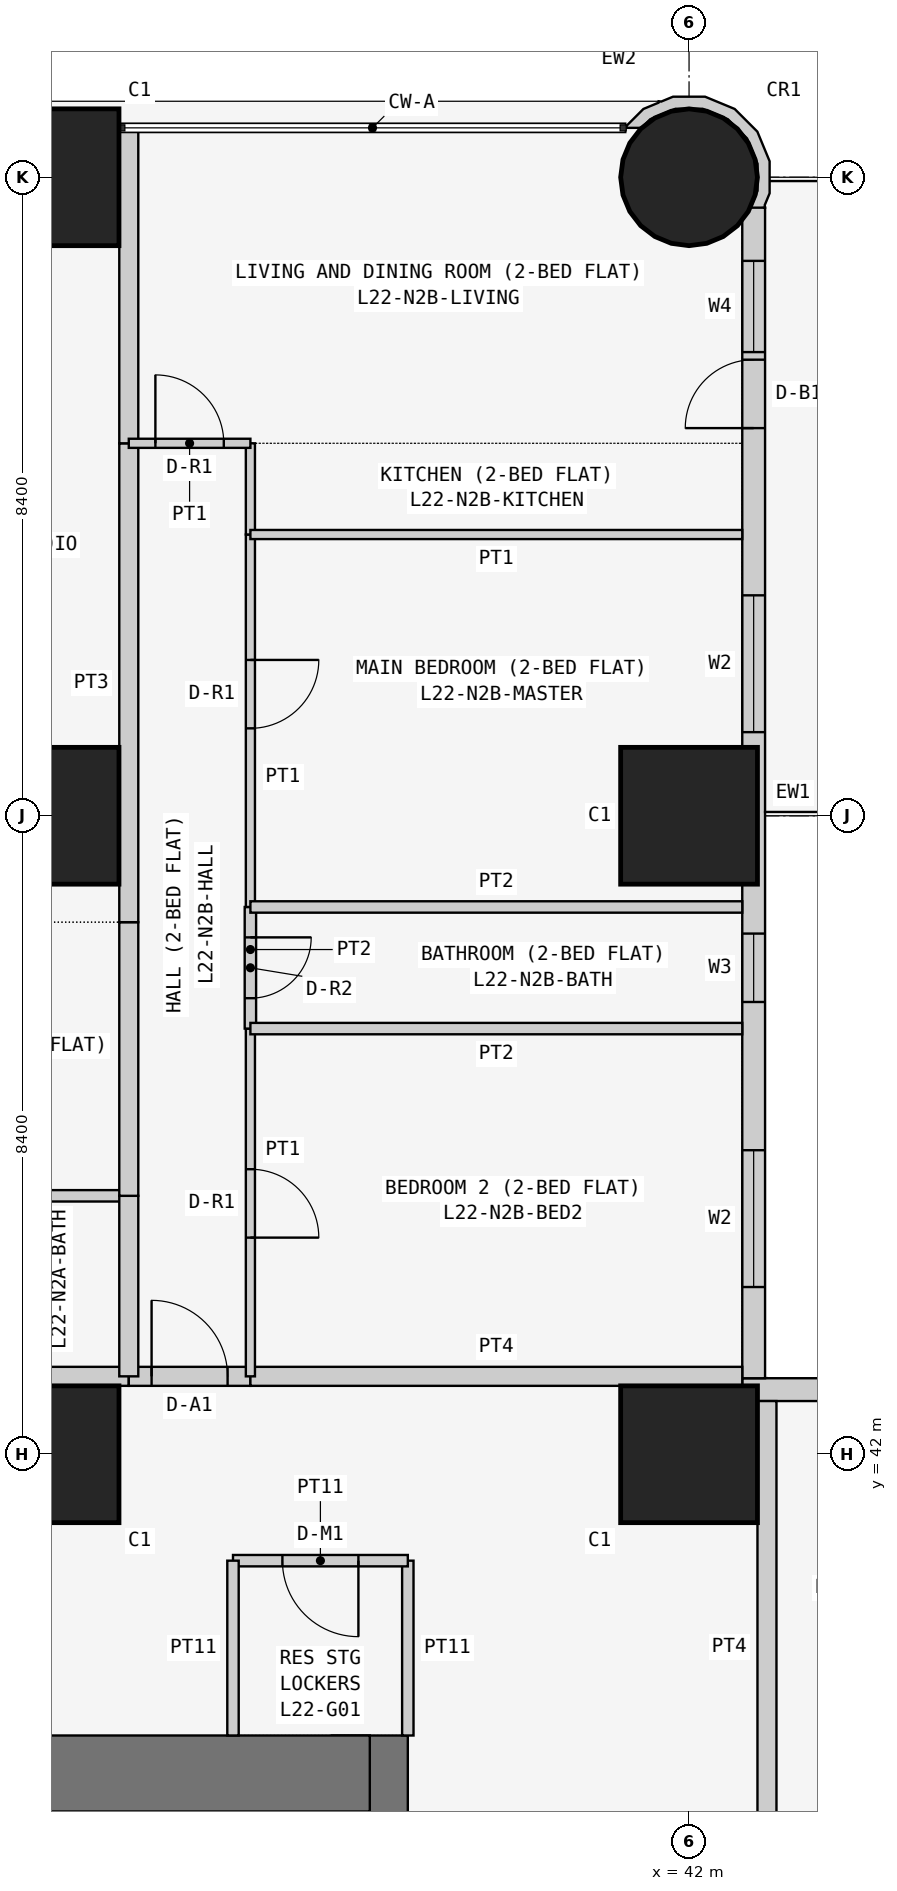
"""IFC4 building model, lengths in metres.
Left out: names, types, materials, properties, quantities, classifications, styles, units other than length and angle.
Written with IfcOpenShell. Run it as: python <this file> out.ifc"""

import sys

from ifc_helpers import new_model, si_unit, direction, frame, frame_2d, origin, origin_2d, place, context, subcontext, project, spatial, polyline, rectangle, circle, outline, extrude, element, fill, save


model = new_model("IFC4")
c1 = context("Model", 3, precision=1e-05, world=origin(), true_north=direction((0.0, 1.0)))
c2 = subcontext(c1, "Body", "Model", "MODEL_VIEW")
j1 = project(units=[si_unit("LENGTHUNIT", "METRE"), si_unit("PLANEANGLEUNIT", "RADIAN")], contexts=[c1])
p1 = place(None, origin())
s1 = spatial("IfcSite", under=j1, at=p1, CompositionType="ELEMENT")
p2 = place(p1, origin())
s2 = spatial("IfcBuilding", under=s1, at=p2, CompositionType="ELEMENT")
p3 = place(p2, frame((0.0, 0.0, 88.5)))
s3 = spatial("IfcBuildingStorey", under=s2, at=p3, CompositionType="ELEMENT", Elevation=88.5)
for number, where, z_axis, x_axis in (
    (1, (33.6, 42.0, 0.0), (0.0, 0.0, 1.0), (1.0, 0.0, 0.0)),
    (2, (33.6, 50.4, 0.0), (0.0, 0.0, 1.0), (1.0, 0.0, 0.0)),
    (3, (33.6, 58.8, 0.0), (0.0, 0.0, 1.0), (1.0, 0.0, 0.0)),
    (4, (42.0, 42.0, 0.0), (0.0, 0.0, 1.0), (1.0, 0.0, 0.0)),
    (5, (42.0, 50.4, 0.0), (0.0, 0.0, 1.0), (1.0, 0.0, 0.0)),
):
    element("IfcColumn", number, at=place(p3, frame(where, z_axis=z_axis, x_axis=x_axis)), inside=s3, PredefinedType="COLUMN", context=c2, shape_type="SweptSolid", body=[
        extrude(rectangle(XDim=1.8, YDim=1.8, at=origin_2d()), origin(), (0.0, 0.0, 1.0), 3.6),
    ])
p4 = place(p3, frame((42.0, 58.8, 0.0), z_axis=(0.0, 0.0, 1.0), x_axis=(1.0, 0.0, 0.0)))
e6 = element("IfcColumn", 6, at=p4, inside=s3, PredefinedType="COLUMN", context=c2, shape_type="SweptSolid", body=[
    extrude(circle(Radius=0.9, at=origin_2d()), origin(), (0.0, 0.0, 1.0), 3.6),
])
p5 = place(p3, frame((37.8, 21.0, 0.0), z_axis=(0.0, 0.0, 1.0), x_axis=(0.0, 1.0, 0.0)))
e7 = element("IfcWall", 7, at=p5, inside=s3, PredefinedType="SHEAR", context=c2, shape_type="SweptSolid", body=[
    extrude(rectangle(XDim=17.3, YDim=1.0, at=frame_2d((8.65, 0.0))), origin(), (0.0, 0.0, 1.0), 3.6),
])
p6 = place(p5, frame((5.2, 0.0, 0.0)))
e8 = element("IfcOpeningElement", 8, at=p6, cuts=e7, PredefinedType="OPENING", context=c2, shape_type="SweptSolid", body=[
    extrude(rectangle(XDim=1.2, YDim=2.1, at=frame_2d((0.6, 1.05))), frame((0.0, 0.51, 0.0), z_axis=(0.0, -1.0, 0.0), x_axis=(1.0, 0.0, 0.0)), (0.0, 0.0, 1.0), 1.02),
])
p7 = place(p3, frame((37.8, 37.8, 0.0), z_axis=(0.0, 0.0, 1.0), x_axis=(-1.0, 0.0, 0.0)))
e9 = element("IfcWall", 9, at=p7, inside=s3, PredefinedType="SHEAR", context=c2, shape_type="SweptSolid", body=[
    extrude(rectangle(XDim=17.3, YDim=1.0, at=frame_2d((8.65, 0.0))), origin(), (0.0, 0.0, 1.0), 3.6),
])
p8 = place(p3, frame((58.4, 42.85, 0.0), z_axis=(0.0, 0.0, 1.0), x_axis=(-1.0, 0.0, 0.0)))
e10 = element("IfcWall", 10, at=p8, inside=s3, PredefinedType="SOLIDWALL", context=c2, shape_type="SweptSolid", body=[
    extrude(rectangle(XDim=15.7, YDim=0.3, at=frame_2d((7.85, 0.0))), origin(), (0.0, 0.0, 1.0), 3.45),
])
p9 = place(p8, frame((12.4, 0.0, 0.9)))
e11 = element("IfcOpeningElement", 11, at=p9, cuts=e10, PredefinedType="OPENING", context=c2, shape_type="SweptSolid", body=[
    extrude(rectangle(XDim=1.8, YDim=1.5, at=frame_2d((0.9, 0.75))), frame((0.0, 0.16, 0.0), z_axis=(0.0, -1.0, 0.0), x_axis=(1.0, 0.0, 0.0)), (0.0, 0.0, 1.0), 0.32),
])
p10 = place(p8, frame((9.55, 0.0, 1.5)))
e12 = element("IfcOpeningElement", 12, at=p10, cuts=e10, PredefinedType="OPENING", context=c2, shape_type="SweptSolid", body=[
    extrude(rectangle(XDim=0.9, YDim=0.7, at=frame_2d((0.45, 0.35))), frame((0.0, 0.16, 0.0), z_axis=(0.0, -1.0, 0.0), x_axis=(1.0, 0.0, 0.0)), (0.0, 0.0, 1.0), 0.32),
])
p11 = place(p8, frame((5.1, 0.0, 0.9)))
e13 = element("IfcOpeningElement", 13, at=p11, cuts=e10, PredefinedType="OPENING", context=c2, shape_type="SweptSolid", body=[
    extrude(rectangle(XDim=1.8, YDim=1.5, at=frame_2d((0.9, 0.75))), frame((0.0, 0.16, 0.0), z_axis=(0.0, -1.0, 0.0), x_axis=(1.0, 0.0, 0.0)), (0.0, 0.0, 1.0), 0.32),
])
p12 = place(p8, frame((2.0, 0.0, 0.0)))
e14 = element("IfcOpeningElement", 14, at=p12, cuts=e10, PredefinedType="OPENING", context=c2, shape_type="SweptSolid", body=[
    extrude(rectangle(XDim=0.9, YDim=2.4, at=frame_2d((0.45, 1.2))), frame((0.0, 0.16, 0.0), z_axis=(0.0, -1.0, 0.0), x_axis=(1.0, 0.0, 0.0)), (0.0, 0.0, 1.0), 0.32),
])
p13 = place(p8, frame((0.7, 0.0, 0.9)))
e15 = element("IfcOpeningElement", 15, at=p13, cuts=e10, PredefinedType="OPENING", context=c2, shape_type="SweptSolid", body=[
    extrude(rectangle(XDim=1.2, YDim=1.5, at=frame_2d((0.6, 0.75))), frame((0.0, 0.16, 0.0), z_axis=(0.0, -1.0, 0.0), x_axis=(1.0, 0.0, 0.0)), (0.0, 0.0, 1.0), 0.32),
])
p14 = place(p3, frame((42.85, 43.0, 0.0), z_axis=(0.0, 0.0, 1.0), x_axis=(0.0, 1.0, 0.0)))
e16 = element("IfcWall", 16, at=p14, inside=s3, PredefinedType="SOLIDWALL", context=c2, shape_type="SweptSolid", body=[
    extrude(rectangle(XDim=15.4, YDim=0.3, at=frame_2d((7.7, 0.0))), origin(), (0.0, 0.0, 1.0), 3.45),
])
p15 = place(p14, frame((1.2, 0.0, 0.9)))
e17 = element("IfcOpeningElement", 17, at=p15, cuts=e16, PredefinedType="OPENING", context=c2, shape_type="SweptSolid", body=[
    extrude(rectangle(XDim=1.8, YDim=1.5, at=frame_2d((0.9, 0.75))), frame((0.0, 0.16, 0.0), z_axis=(0.0, -1.0, 0.0), x_axis=(1.0, 0.0, 0.0)), (0.0, 0.0, 1.0), 0.32),
])
p16 = place(p14, frame((4.95, 0.0, 1.5)))
e18 = element("IfcOpeningElement", 18, at=p16, cuts=e16, PredefinedType="OPENING", context=c2, shape_type="SweptSolid", body=[
    extrude(rectangle(XDim=0.9, YDim=0.7, at=frame_2d((0.45, 0.35))), frame((0.0, 0.16, 0.0), z_axis=(0.0, -1.0, 0.0), x_axis=(1.0, 0.0, 0.0)), (0.0, 0.0, 1.0), 0.32),
])
p17 = place(p14, frame((8.5, 0.0, 0.9)))
e19 = element("IfcOpeningElement", 19, at=p17, cuts=e16, PredefinedType="OPENING", context=c2, shape_type="SweptSolid", body=[
    extrude(rectangle(XDim=1.8, YDim=1.5, at=frame_2d((0.9, 0.75))), frame((0.0, 0.16, 0.0), z_axis=(0.0, -1.0, 0.0), x_axis=(1.0, 0.0, 0.0)), (0.0, 0.0, 1.0), 0.32),
])
p18 = place(p14, frame((12.5, 0.0, 0.0)))
e20 = element("IfcOpeningElement", 20, at=p18, cuts=e16, PredefinedType="OPENING", context=c2, shape_type="SweptSolid", body=[
    extrude(rectangle(XDim=0.9, YDim=2.4, at=frame_2d((0.45, 1.2))), frame((0.0, 0.16, 0.0), z_axis=(0.0, -1.0, 0.0), x_axis=(1.0, 0.0, 0.0)), (0.0, 0.0, 1.0), 0.32),
])
p19 = place(p14, frame((13.5, 0.0, 0.9)))
e21 = element("IfcOpeningElement", 21, at=p19, cuts=e16, PredefinedType="OPENING", context=c2, shape_type="SweptSolid", body=[
    extrude(rectangle(XDim=1.2, YDim=1.5, at=frame_2d((0.6, 0.75))), frame((0.0, 0.16, 0.0), z_axis=(0.0, -1.0, 0.0), x_axis=(1.0, 0.0, 0.0)), (0.0, 0.0, 1.0), 0.32),
])
p20 = place(p3, frame((42.91, 58.436, 0.0), z_axis=(0.0, 0.0, 1.0), x_axis=(0.377204953059, 0.926129809145, 0.0)))
e22 = element("IfcWall", 22, at=p20, inside=s3, PredefinedType="SOLIDWALL", context=c2, shape_type="SweptSolid", body=[
    extrude(outline(polyline([(0.769, 1.728), (0.75, 1.723), (0.6, 1.875), (0.295, 2.004), (0.281, 1.998), (0.36, 1.803), (0.509, 1.741), (0.761, 1.486), (0.896, 1.154), (0.894, 0.795), (0.755, 0.465), (0.5, 0.213), (0.168, 0.078), (-0.1, 0.08), (0.001, -0.097), (0.03, -0.08), (0.198, -0.081), (0.589, 0.078), (0.889, 0.374), (1.052, 0.763), (1.055, 1.185), (0.896, 1.575), (0.778, 1.695), (0.769, 1.728)])), origin(), (0.0, 0.0, 1.0), 3.45),
])
p21 = place(p3, frame((38.3, 38.3, 0.0), z_axis=(0.0, 0.0, 1.0), x_axis=(0.0, 1.0, 0.0)))
e23 = element("IfcWall", 23, at=p21, inside=s3, PredefinedType="PARTITIONING", context=c2, shape_type="SweptSolid", body=[
    extrude(rectangle(XDim=2.3, YDim=0.15, at=frame_2d((1.15, 0.0))), origin(), (0.0, 0.0, 1.0), 3.45),
])
p22 = place(p3, frame((38.3, 40.6, 0.0), z_axis=(0.0, 0.0, 1.0), x_axis=(-1.0, 0.0, 0.0)))
e24 = element("IfcWall", 24, at=p22, inside=s3, PredefinedType="PARTITIONING", context=c2, shape_type="SweptSolid", body=[
    extrude(rectangle(XDim=2.3, YDim=0.15, at=frame_2d((1.15, 0.0))), origin(), (0.0, 0.0, 1.0), 3.45),
])
p23 = place(p22, frame((0.65, 0.0, 0.0)))
e25 = element("IfcOpeningElement", 25, at=p23, cuts=e24, PredefinedType="OPENING", context=c2, shape_type="SweptSolid", body=[
    extrude(rectangle(XDim=1.0, YDim=2.1, at=frame_2d((0.5, 1.05))), frame((0.0, 0.085, 0.0), z_axis=(0.0, -1.0, 0.0), x_axis=(1.0, 0.0, 0.0)), (0.0, 0.0, 1.0), 0.17),
])
p24 = place(p3, frame((36.0, 40.6, 0.0), z_axis=(0.0, 0.0, 1.0), x_axis=(0.0, -1.0, 0.0)))
e26 = element("IfcWall", 26, at=p24, inside=s3, PredefinedType="PARTITIONING", context=c2, shape_type="SweptSolid", body=[
    extrude(rectangle(XDim=2.3, YDim=0.15, at=frame_2d((1.15, 0.0))), origin(), (0.0, 0.0, 1.0), 3.45),
])
p25 = place(p3, frame((32.0, 43.025, 0.0), z_axis=(0.0, 0.0, 1.0), x_axis=(1.0, 0.0, 0.0)))
e27 = element("IfcWall", 27, at=p25, inside=s3, PredefinedType="PARTITIONING", context=c2, shape_type="SweptSolid", body=[
    extrude(rectangle(XDim=2.629, YDim=0.25, at=frame_2d((1.314, 0.0))), origin(), (0.0, 0.0, 1.0), 3.45),
])
p26 = place(p3, frame((34.629, 43.025, 0.0), z_axis=(0.0, 0.0, 1.0), x_axis=(1.0, 0.0, 0.0)))
e28 = element("IfcWall", 28, at=p26, inside=s3, PredefinedType="PARTITIONING", context=c2, shape_type="SweptSolid", body=[
    extrude(rectangle(XDim=1.6, YDim=0.25, at=frame_2d((0.8, 0.0))), origin(), (0.0, 0.0, 1.0), 3.45),
])
p27 = place(p26, frame((0.3, 0.0, 0.0)))
e29 = element("IfcOpeningElement", 29, at=p27, cuts=e28, PredefinedType="OPENING", context=c2, shape_type="SweptSolid", body=[
    extrude(rectangle(XDim=1.0, YDim=2.1, at=frame_2d((0.5, 1.05))), frame((0.0, 0.135, 0.0), z_axis=(0.0, -1.0, 0.0), x_axis=(1.0, 0.0, 0.0)), (0.0, 0.0, 1.0), 0.27),
])
for number, where, z_axis, x_axis in (
    (30, (36.229, 43.025, 0.0), (0.0, 0.0, 1.0), (1.0, 0.0, 0.0)),
    (31, (43.025, 42.7, 0.0), (0.0, 0.0, 1.0), (0.0, -1.0, 0.0)),
):
    element("IfcWall", number, at=place(p3, frame(where, z_axis=z_axis, x_axis=x_axis)), inside=s3, PredefinedType="PARTITIONING", context=c2, shape_type="SweptSolid", body=[
        extrude(rectangle(XDim=6.471, YDim=0.25, at=frame_2d((3.235, 0.0))), origin(), (0.0, 0.0, 1.0), 3.45),
    ])
p28 = place(p3, frame((32.0, 45.4, 0.0), z_axis=(0.0, 0.0, 1.0), x_axis=(1.0, 0.0, 0.0)))
e32 = element("IfcWall", 32, at=p28, inside=s3, PredefinedType="PARTITIONING", context=c2, shape_type="SweptSolid", body=[
    extrude(rectangle(XDim=2.629, YDim=0.15, at=frame_2d((1.314, 0.0))), origin(), (0.0, 0.0, 1.0), 3.45),
])
p29 = place(p3, frame((34.629, 45.4, 0.0), z_axis=(0.0, 0.0, 1.0), x_axis=(0.0, -1.0, 0.0)))
e33 = element("IfcWall", 33, at=p29, inside=s3, PredefinedType="PARTITIONING", context=c2, shape_type="SweptSolid", body=[
    extrude(rectangle(XDim=2.375, YDim=0.25, at=frame_2d((1.188, 0.0))), origin(), (0.0, 0.0, 1.0), 3.45),
])
p30 = place(p3, frame((34.629, 49.0, 0.0), z_axis=(0.0, 0.0, 1.0), x_axis=(0.0, -1.0, 0.0)))
e34 = element("IfcWall", 34, at=p30, inside=s3, PredefinedType="PARTITIONING", context=c2, shape_type="SweptSolid", body=[
    extrude(rectangle(XDim=3.6, YDim=0.25, at=frame_2d((1.8, 0.0))), origin(), (0.0, 0.0, 1.0), 3.45),
])
p31 = place(p3, frame((34.629, 55.3, 0.0), z_axis=(0.0, 0.0, 1.0), x_axis=(0.0, -1.0, 0.0)))
e35 = element("IfcWall", 35, at=p31, inside=s3, PredefinedType="PARTITIONING", context=c2, shape_type="SweptSolid", body=[
    extrude(rectangle(XDim=6.3, YDim=0.25, at=frame_2d((3.15, 0.0))), origin(), (0.0, 0.0, 1.0), 3.45),
])
p32 = place(p3, frame((34.629, 59.45, 0.0), z_axis=(0.0, 0.0, 1.0), x_axis=(0.0, -1.0, 0.0)))
e36 = element("IfcWall", 36, at=p32, inside=s3, PredefinedType="PARTITIONING", context=c2, shape_type="SweptSolid", body=[
    extrude(rectangle(XDim=4.15, YDim=0.25, at=frame_2d((2.075, 0.0))), origin(), (0.0, 0.0, 1.0), 3.45),
])
p33 = place(p3, frame((36.229, 47.6, 0.0), z_axis=(0.0, 0.0, 1.0), x_axis=(0.0, -1.0, 0.0)))
e37 = element("IfcWall", 37, at=p33, inside=s3, PredefinedType="PARTITIONING", context=c2, shape_type="SweptSolid", body=[
    extrude(rectangle(XDim=4.575, YDim=0.12, at=frame_2d((2.288, 0.0))), origin(), (0.0, 0.0, 1.0), 3.45),
])
p34 = place(p33, frame((1.85, 0.0, 0.0)))
e38 = element("IfcOpeningElement", 38, at=p34, cuts=e37, PredefinedType="OPENING", context=c2, shape_type="SweptSolid", body=[
    extrude(rectangle(XDim=0.9, YDim=2.1, at=frame_2d((0.45, 1.05))), frame((0.0, 0.07, 0.0), z_axis=(0.0, -1.0, 0.0), x_axis=(1.0, 0.0, 0.0)), (0.0, 0.0, 1.0), 0.14),
])
p35 = place(p3, frame((36.229, 49.2, 0.0), z_axis=(0.0, 0.0, 1.0), x_axis=(0.0, -1.0, 0.0)))
e39 = element("IfcWall", 39, at=p35, inside=s3, PredefinedType="PARTITIONING", context=c2, shape_type="SweptSolid", body=[
    extrude(rectangle(XDim=1.6, YDim=0.15, at=frame_2d((0.8, 0.0))), origin(), (0.0, 0.0, 1.0), 3.45),
])
p36 = place(p35, frame((0.4, 0.0, 0.0)))
e40 = element("IfcOpeningElement", 40, at=p36, cuts=e39, PredefinedType="OPENING", context=c2, shape_type="SweptSolid", body=[
    extrude(rectangle(XDim=0.8, YDim=2.1, at=frame_2d((0.4, 1.05))), frame((0.0, 0.085, 0.0), z_axis=(0.0, -1.0, 0.0), x_axis=(1.0, 0.0, 0.0)), (0.0, 0.0, 1.0), 0.17),
])
p37 = place(p3, frame((36.229, 54.1, 0.0), z_axis=(0.0, 0.0, 1.0), x_axis=(0.0, -1.0, 0.0)))
e41 = element("IfcWall", 41, at=p37, inside=s3, PredefinedType="PARTITIONING", context=c2, shape_type="SweptSolid", body=[
    extrude(rectangle(XDim=4.9, YDim=0.12, at=frame_2d((2.45, 0.0))), origin(), (0.0, 0.0, 1.0), 3.45),
])
p38 = place(p37, frame((1.65, 0.0, 0.0)))
e42 = element("IfcOpeningElement", 42, at=p38, cuts=e41, PredefinedType="OPENING", context=c2, shape_type="SweptSolid", body=[
    extrude(rectangle(XDim=0.9, YDim=2.1, at=frame_2d((0.45, 1.05))), frame((0.0, 0.07, 0.0), z_axis=(0.0, -1.0, 0.0), x_axis=(1.0, 0.0, 0.0)), (0.0, 0.0, 1.0), 0.14),
])
p39 = place(p3, frame((36.229, 55.3, 0.0), z_axis=(0.0, 0.0, 1.0), x_axis=(0.0, -1.0, 0.0)))
e43 = element("IfcWall", 43, at=p39, inside=s3, PredefinedType="PARTITIONING", context=c2, shape_type="SweptSolid", body=[
    extrude(rectangle(XDim=1.2, YDim=0.12, at=frame_2d((0.6, 0.0))), origin(), (0.0, 0.0, 1.0), 3.45),
])
p40 = place(p3, frame((34.629, 55.3, 0.0), z_axis=(0.0, 0.0, 1.0), x_axis=(1.0, 0.0, 0.0)))
e44 = element("IfcWall", 44, at=p40, inside=s3, PredefinedType="PARTITIONING", context=c2, shape_type="SweptSolid", body=[
    extrude(rectangle(XDim=1.6, YDim=0.12, at=frame_2d((0.8, 0.0))), origin(), (0.0, 0.0, 1.0), 3.45),
])
p41 = place(p40, frame((0.35, 0.0, 0.0)))
e45 = element("IfcOpeningElement", 45, at=p41, cuts=e44, PredefinedType="OPENING", context=c2, shape_type="SweptSolid", body=[
    extrude(rectangle(XDim=0.9, YDim=2.1, at=frame_2d((0.45, 1.05))), frame((0.0, 0.07, 0.0), z_axis=(0.0, -1.0, 0.0), x_axis=(1.0, 0.0, 0.0)), (0.0, 0.0, 1.0), 0.14),
])
for number, where, z_axis, x_axis in (
    (46, (36.229, 47.6, 0.0), (0.0, 0.0, 1.0), (1.0, 0.0, 0.0)),
    (47, (36.229, 49.2, 0.0), (0.0, 0.0, 1.0), (1.0, 0.0, 0.0)),
):
    element("IfcWall", number, at=place(p3, frame(where, z_axis=z_axis, x_axis=x_axis)), inside=s3, PredefinedType="PARTITIONING", context=c2, shape_type="SweptSolid", body=[
        extrude(rectangle(XDim=6.471, YDim=0.15, at=frame_2d((3.235, 0.0))), origin(), (0.0, 0.0, 1.0), 3.45),
    ])
p42 = place(p3, frame((36.229, 54.1, 0.0), z_axis=(0.0, 0.0, 1.0), x_axis=(1.0, 0.0, 0.0)))
e48 = element("IfcWall", 48, at=p42, inside=s3, PredefinedType="PARTITIONING", context=c2, shape_type="SweptSolid", body=[
    extrude(rectangle(XDim=6.471, YDim=0.12, at=frame_2d((3.235, 0.0))), origin(), (0.0, 0.0, 1.0), 3.45),
])
p43 = place(p15, origin())
e49 = element("IfcWindow", 49, at=p43, inside=s3, PartitioningType="SINGLE_PANEL", PredefinedType="WINDOW", context=c2, shape_type="SweptSolid", body=[
    extrude(rectangle(XDim=1.8, YDim=1.5, at=frame_2d((0.9, 0.75))), frame((0.0, 0.03, 0.0), z_axis=(0.0, -1.0, 0.0), x_axis=(1.0, 0.0, 0.0)), (0.0, 0.0, 1.0), 0.06),
])
fill(e17, e49)
p44 = place(p16, origin())
e50 = element("IfcWindow", 50, at=p44, inside=s3, PartitioningType="SINGLE_PANEL", PredefinedType="WINDOW", context=c2, shape_type="SweptSolid", body=[
    extrude(rectangle(XDim=0.9, YDim=0.7, at=frame_2d((0.45, 0.35))), frame((0.0, 0.03, 0.0), z_axis=(0.0, -1.0, 0.0), x_axis=(1.0, 0.0, 0.0)), (0.0, 0.0, 1.0), 0.06),
])
fill(e18, e50)
p45 = place(p17, origin())
e51 = element("IfcWindow", 51, at=p45, inside=s3, PartitioningType="SINGLE_PANEL", PredefinedType="WINDOW", context=c2, shape_type="SweptSolid", body=[
    extrude(rectangle(XDim=1.8, YDim=1.5, at=frame_2d((0.9, 0.75))), frame((0.0, 0.03, 0.0), z_axis=(0.0, -1.0, 0.0), x_axis=(1.0, 0.0, 0.0)), (0.0, 0.0, 1.0), 0.06),
])
fill(e19, e51)
p46 = place(p18, origin())
e52 = element("IfcDoor", 52, at=p46, inside=s3, OperationType="SINGLE_SWING_LEFT", PredefinedType="DOOR", context=c2, shape_type="SweptSolid", body=[
    extrude(rectangle(XDim=0.9, YDim=2.4, at=frame_2d((0.45, 1.2))), frame((0.0, 0.025, 0.0), z_axis=(0.0, -1.0, 0.0), x_axis=(1.0, 0.0, 0.0)), (0.0, 0.0, 1.0), 0.05),
])
fill(e20, e52)
p47 = place(p19, origin())
e53 = element("IfcWindow", 53, at=p47, inside=s3, PartitioningType="SINGLE_PANEL", PredefinedType="WINDOW", context=c2, shape_type="SweptSolid", body=[
    extrude(rectangle(XDim=1.2, YDim=1.5, at=frame_2d((0.6, 0.75))), frame((0.0, 0.03, 0.0), z_axis=(0.0, -1.0, 0.0), x_axis=(1.0, 0.0, 0.0)), (0.0, 0.0, 1.0), 0.06),
])
fill(e21, e53)
p48 = place(p23, origin())
e54 = element("IfcDoor", 54, at=p48, inside=s3, OperationType="SINGLE_SWING_LEFT", PredefinedType="DOOR", context=c2, shape_type="SweptSolid", body=[
    extrude(rectangle(XDim=1.0, YDim=2.1, at=frame_2d((0.5, 1.05))), frame((0.0, 0.025, 0.0), z_axis=(0.0, -1.0, 0.0), x_axis=(1.0, 0.0, 0.0)), (0.0, 0.0, 1.0), 0.05),
])
fill(e25, e54)
p49 = place(p27, origin())
e55 = element("IfcDoor", 55, at=p49, inside=s3, OperationType="SINGLE_SWING_LEFT", PredefinedType="DOOR", context=c2, shape_type="SweptSolid", body=[
    extrude(rectangle(XDim=1.0, YDim=2.1, at=frame_2d((0.5, 1.05))), frame((0.0, 0.025, 0.0), z_axis=(0.0, -1.0, 0.0), x_axis=(1.0, 0.0, 0.0)), (0.0, 0.0, 1.0), 0.05),
])
fill(e29, e55)
p50 = place(p34, origin())
e56 = element("IfcDoor", 56, at=p50, inside=s3, OperationType="SINGLE_SWING_RIGHT", PredefinedType="DOOR", context=c2, shape_type="SweptSolid", body=[
    extrude(rectangle(XDim=0.9, YDim=2.1, at=frame_2d((0.45, 1.05))), frame((0.0, 0.025, 0.0), z_axis=(0.0, -1.0, 0.0), x_axis=(1.0, 0.0, 0.0)), (0.0, 0.0, 1.0), 0.05),
])
fill(e38, e56)
p51 = place(p36, origin())
e57 = element("IfcDoor", 57, at=p51, inside=s3, OperationType="SINGLE_SWING_LEFT", PredefinedType="DOOR", context=c2, shape_type="SweptSolid", body=[
    extrude(rectangle(XDim=0.8, YDim=2.1, at=frame_2d((0.4, 1.05))), frame((0.0, 0.025, 0.0), z_axis=(0.0, -1.0, 0.0), x_axis=(1.0, 0.0, 0.0)), (0.0, 0.0, 1.0), 0.05),
])
fill(e40, e57)
p52 = place(p38, origin())
e58 = element("IfcDoor", 58, at=p52, inside=s3, OperationType="SINGLE_SWING_LEFT", PredefinedType="DOOR", context=c2, shape_type="SweptSolid", body=[
    extrude(rectangle(XDim=0.9, YDim=2.1, at=frame_2d((0.45, 1.05))), frame((0.0, 0.025, 0.0), z_axis=(0.0, -1.0, 0.0), x_axis=(1.0, 0.0, 0.0)), (0.0, 0.0, 1.0), 0.05),
])
fill(e42, e58)
p53 = place(p41, origin())
e59 = element("IfcDoor", 59, at=p53, inside=s3, OperationType="SINGLE_SWING_LEFT", PredefinedType="DOOR", context=c2, shape_type="SweptSolid", body=[
    extrude(rectangle(XDim=0.9, YDim=2.1, at=frame_2d((0.45, 1.05))), frame((0.0, 0.025, 0.0), z_axis=(0.0, -1.0, 0.0), x_axis=(1.0, 0.0, 0.0)), (0.0, 0.0, 1.0), 0.05),
])
fill(e45, e59)
save(model, sys.argv[1])
